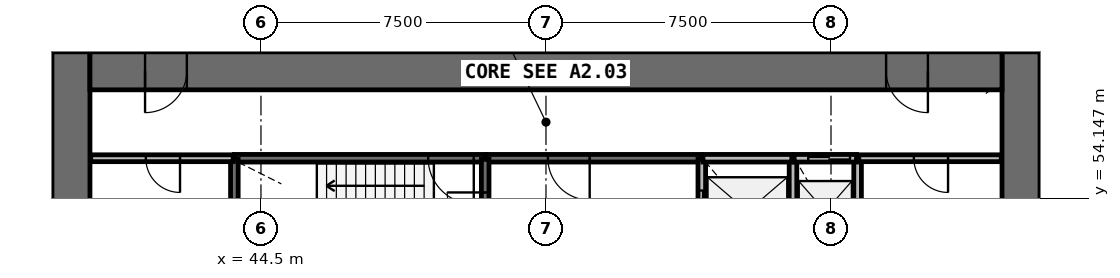
"""IFC4 building model, lengths in metres.
Left out: names, types, materials, properties, quantities, classifications, styles, units other than length and angle.
Written with IfcOpenShell. Run it as: python <this file> out.ifc"""

import sys

from ifc_helpers import new_model, si_unit, direction, frame, frame_2d, origin, place, context, subcontext, project, spatial, rectangle, extrude, source, transform, mapped, element, fill, save


model = new_model("IFC4")
c1 = context("Model", 3, precision=1e-05, world=origin(), true_north=direction((0.0, 1.0)))
c2 = subcontext(c1, "Body", "Model", "MODEL_VIEW")
j1 = project(units=[si_unit("LENGTHUNIT", "METRE"), si_unit("PLANEANGLEUNIT", "RADIAN")], contexts=[c1])
p1 = place(None, origin())
s1 = spatial("IfcSite", under=j1, at=p1, CompositionType="ELEMENT")
p2 = place(p1, origin())
s2 = spatial("IfcBuilding", under=s1, at=p2, CompositionType="ELEMENT")
p3 = place(p2, frame((0.0, 0.0, 9.4)))
s3 = spatial("IfcBuildingStorey", under=s2, at=p3, CompositionType="ELEMENT", Elevation=9.4)
p4 = place(p3, frame((64.5, 38.0, 0.0), z_axis=(0.0, 0.0, 1.0), x_axis=(0.0, 1.0, 0.0)))
e1 = element("IfcWall", 1, at=p4, inside=s3, PredefinedType="SHEAR", context=c2, shape_type="SweptSolid", body=[
    extrude(rectangle(XDim=20.0, YDim=1.0, at=frame_2d((10.0, 0.0))), origin(), (0.0, 0.0, 1.0), 4.4),
])
p5 = place(p4, frame((9.1, 0.0, 0.0)))
e2 = element("IfcOpeningElement", 2, at=p5, cuts=e1, PredefinedType="OPENING", context=c2, shape_type="SweptSolid", body=[
    extrude(rectangle(XDim=1.8, YDim=2.1, at=frame_2d((0.9, 1.05))), frame((0.0, 0.51, 0.0), z_axis=(0.0, -1.0, 0.0), x_axis=(1.0, 0.0, 0.0)), (0.0, 0.0, 1.0), 1.02),
])
p6 = place(p3, frame((39.5, 58.0, 0.0), z_axis=(0.0, 0.0, 1.0), x_axis=(0.0, -1.0, 0.0)))
e3 = element("IfcWall", 3, at=p6, inside=s3, PredefinedType="SHEAR", context=c2, shape_type="SweptSolid", body=[
    extrude(rectangle(XDim=20.0, YDim=1.0, at=frame_2d((10.0, 0.0))), origin(), (0.0, 0.0, 1.0), 4.4),
])
p7 = place(p6, frame((9.1, 0.0, 0.0)))
e4 = element("IfcOpeningElement", 4, at=p7, cuts=e3, PredefinedType="OPENING", context=c2, shape_type="SweptSolid", body=[
    extrude(rectangle(XDim=1.8, YDim=2.1, at=frame_2d((0.9, 1.05))), frame((0.0, 0.51, 0.0), z_axis=(0.0, -1.0, 0.0), x_axis=(1.0, 0.0, 0.0)), (0.0, 0.0, 1.0), 1.02),
])
p8 = place(p3, frame((64.0, 57.5, 0.0), z_axis=(0.0, 0.0, 1.0), x_axis=(-1.0, 0.0, 0.0)))
e5 = element("IfcWall", 5, at=p8, inside=s3, PredefinedType="SHEAR", context=c2, shape_type="SweptSolid", body=[
    extrude(rectangle(XDim=24.0, YDim=1.0, at=frame_2d((12.0, 0.0))), origin(), (0.0, 0.0, 1.0), 4.4),
])
p9 = place(p8, frame((21.45, 0.0, 0.0)))
e6 = element("IfcOpeningElement", 6, at=p9, cuts=e5, PredefinedType="OPENING", context=c2, shape_type="SweptSolid", body=[
    extrude(rectangle(XDim=1.1, YDim=2.1, at=frame_2d((0.55, 1.05))), frame((0.0, 0.51, 0.0), z_axis=(0.0, -1.0, 0.0), x_axis=(1.0, 0.0, 0.0)), (0.0, 0.0, 1.0), 1.02),
])
p10 = place(p8, frame((1.95, 0.0, 0.0)))
e7 = element("IfcOpeningElement", 7, at=p10, cuts=e5, PredefinedType="OPENING", context=c2, shape_type="SweptSolid", body=[
    extrude(rectangle(XDim=1.1, YDim=2.1, at=frame_2d((0.55, 1.05))), frame((0.0, 0.51, 0.0), z_axis=(0.0, -1.0, 0.0), x_axis=(1.0, 0.0, 0.0)), (0.0, 0.0, 1.0), 1.02),
])
p11 = place(p3, frame((50.4, 55.2, 0.0), z_axis=(0.0, 0.0, 1.0), x_axis=(-1.0, 0.0, 0.0)))
e8 = element("IfcWall", 8, at=p11, inside=s3, PredefinedType="SOLIDWALL", context=c2, shape_type="SweptSolid", body=[
    extrude(rectangle(XDim=6.6, YDim=0.2, at=frame_2d((3.3, 0.0))), origin(), (0.0, 0.0, 1.0), 3.95),
])
p12 = place(p11, frame((0.3, 0.0, 0.0)))
e9 = element("IfcOpeningElement", 9, at=p12, cuts=e8, PredefinedType="OPENING", context=c2, shape_type="SweptSolid", body=[
    extrude(rectangle(XDim=1.2, YDim=2.1, at=frame_2d((0.6, 1.05))), frame((0.0, 0.11, 0.0), z_axis=(0.0, -1.0, 0.0), x_axis=(1.0, 0.0, 0.0)), (0.0, 0.0, 1.0), 0.22),
])
p13 = place(p3, frame((56.1, 55.2, 0.0), z_axis=(0.0, 0.0, 1.0), x_axis=(-1.0, 0.0, 0.0)))
e10 = element("IfcWall", 10, at=p13, inside=s3, PredefinedType="SOLIDWALL", context=c2, shape_type="SweptSolid", body=[
    extrude(rectangle(XDim=5.67, YDim=0.2, at=frame_2d((2.835, 0.0))), origin(), (0.0, 0.0, 1.0), 3.95),
])
p14 = place(p13, frame((2.95, 0.0, 0.0)))
e11 = element("IfcOpeningElement", 11, at=p14, cuts=e10, PredefinedType="OPENING", context=c2, shape_type="SweptSolid", body=[
    extrude(rectangle(XDim=1.1, YDim=2.1, at=frame_2d((0.55, 1.05))), frame((0.0, 0.11, 0.0), z_axis=(0.0, -1.0, 0.0), x_axis=(1.0, 0.0, 0.0)), (0.0, 0.0, 1.0), 0.22),
])
p15 = place(p3, frame((50.4, 52.4, 0.0), z_axis=(0.0, 0.0, 1.0), x_axis=(0.0, 1.0, 0.0)))
e12 = element("IfcWall", 12, at=p15, inside=s3, PredefinedType="SOLIDWALL", context=c2, shape_type="SweptSolid", body=[
    extrude(rectangle(XDim=2.77, YDim=0.2, at=frame_2d((1.385, 0.0))), origin(), (0.0, 0.0, 1.0), 3.95),
])
p16 = place(p15, frame((0.9, 0.0, 0.0)))
e13 = element("IfcOpeningElement", 13, at=p16, cuts=e12, PredefinedType="OPENING", context=c2, shape_type="SweptSolid", body=[
    extrude(rectangle(XDim=1.0, YDim=2.1, at=frame_2d((0.5, 1.05))), frame((0.0, 0.11, 0.0), z_axis=(0.0, -1.0, 0.0), x_axis=(1.0, 0.0, 0.0)), (0.0, 0.0, 1.0), 0.22),
])
p17 = place(p3, frame((56.1, 55.17, 0.0), z_axis=(0.0, 0.0, 1.0), x_axis=(0.0, -1.0, 0.0)))
e14 = element("IfcWall", 14, at=p17, inside=s3, PredefinedType="SOLIDWALL", context=c2, shape_type="SweptSolid", body=[
    extrude(rectangle(XDim=2.77, YDim=0.2, at=frame_2d((1.385, 0.0))), origin(), (0.0, 0.0, 1.0), 3.95),
])
p18 = place(p17, frame((0.82, 0.0, 0.0)))
e15 = element("IfcOpeningElement", 15, at=p18, cuts=e14, PredefinedType="OPENING", context=c2, shape_type="SweptSolid", body=[
    extrude(rectangle(XDim=1.1, YDim=2.1, at=frame_2d((0.55, 1.05))), frame((0.0, 0.11, 0.0), z_axis=(0.0, -1.0, 0.0), x_axis=(1.0, 0.0, 0.0)), (0.0, 0.0, 1.0), 0.22),
])
for number, where, z_axis, x_axis in (
    (16, (58.5, 52.4, 0.0), (0.0, 0.0, 1.0), (0.0, 1.0, 0.0)),
    (17, (60.2, 52.4, 0.0), (0.0, 0.0, 1.0), (0.0, 1.0, 0.0)),
):
    element("IfcWall", number, at=place(p3, frame(where, z_axis=z_axis, x_axis=x_axis)), inside=s3, PredefinedType="SOLIDWALL", context=c2, shape_type="SweptSolid", body=[
        extrude(rectangle(XDim=2.8, YDim=0.2, at=frame_2d((1.4, 0.0))), origin(), (0.0, 0.0, 1.0), 3.95),
    ])
p19 = place(p3, frame((58.47, 55.2, 0.0), z_axis=(0.0, 0.0, 1.0), x_axis=(-1.0, 0.0, 0.0)))
e18 = element("IfcWall", 18, at=p19, inside=s3, PredefinedType="SOLIDWALL", context=c2, shape_type="SweptSolid", body=[
    extrude(rectangle(XDim=2.34, YDim=0.2, at=frame_2d((1.17, 0.0))), origin(), (0.0, 0.0, 1.0), 3.95),
])
p20 = place(p3, frame((43.8, 55.17, 0.0), z_axis=(0.0, 0.0, 1.0), x_axis=(0.0, -1.0, 0.0)))
e19 = element("IfcWall", 19, at=p20, inside=s3, PredefinedType="SOLIDWALL", context=c2, shape_type="SweptSolid", body=[
    extrude(rectangle(XDim=2.14, YDim=0.2, at=frame_2d((1.07, 0.0))), origin(), (0.0, 0.0, 1.0), 3.95),
])
p21 = place(p3, frame((60.17, 55.2, 0.0), z_axis=(0.0, 0.0, 1.0), x_axis=(-1.0, 0.0, 0.0)))
e20 = element("IfcWall", 20, at=p21, inside=s3, PredefinedType="SOLIDWALL", context=c2, shape_type="SweptSolid", body=[
    extrude(rectangle(XDim=1.64, YDim=0.2, at=frame_2d((0.82, 0.0))), origin(), (0.0, 0.0, 1.0), 3.95),
])
p22 = place(p21, frame((0.17, 0.0, 0.0)))
e21 = element("IfcOpeningElement", 21, at=p22, cuts=e20, PredefinedType="OPENING", context=c2, shape_type="SweptSolid", body=[
    extrude(rectangle(XDim=1.1, YDim=2.1, at=frame_2d((0.55, 1.05))), frame((0.0, 0.11, 0.0), z_axis=(0.0, -1.0, 0.0), x_axis=(1.0, 0.0, 0.0)), (0.0, 0.0, 1.0), 0.22),
])
p23 = place(p3, frame((43.77, 55.2, 0.0), z_axis=(0.0, 0.0, 1.0), x_axis=(-1.0, 0.0, 0.0)))
e22 = element("IfcWall", 22, at=p23, inside=s3, PredefinedType="PARTITIONING", context=c2, shape_type="SweptSolid", body=[
    extrude(rectangle(XDim=3.75, YDim=0.18, at=frame_2d((1.875, 0.0))), origin(), (0.0, 0.0, 1.0), 3.95),
])
p24 = place(p23, frame((1.4, 0.0, 0.0)))
e23 = element("IfcOpeningElement", 23, at=p24, cuts=e22, PredefinedType="OPENING", context=c2, shape_type="SweptSolid", body=[
    extrude(rectangle(XDim=0.9, YDim=2.1, at=frame_2d((0.45, 1.05))), frame((0.0, 0.1, 0.0), z_axis=(0.0, -1.0, 0.0), x_axis=(1.0, 0.0, 0.0)), (0.0, 0.0, 1.0), 0.2),
])
p25 = place(p3, frame((63.98, 55.2, 0.0), z_axis=(0.0, 0.0, 1.0), x_axis=(-1.0, 0.0, 0.0)))
e24 = element("IfcWall", 24, at=p25, inside=s3, PredefinedType="PARTITIONING", context=c2, shape_type="SweptSolid", body=[
    extrude(rectangle(XDim=3.75, YDim=0.18, at=frame_2d((1.875, 0.0))), origin(), (0.0, 0.0, 1.0), 3.95),
])
p26 = place(p25, frame((1.4, 0.0, 0.0)))
e25 = element("IfcOpeningElement", 25, at=p26, cuts=e24, PredefinedType="OPENING", context=c2, shape_type="SweptSolid", body=[
    extrude(rectangle(XDim=0.9, YDim=2.1, at=frame_2d((0.45, 1.05))), frame((0.0, 0.1, 0.0), z_axis=(0.0, -1.0, 0.0), x_axis=(1.0, 0.0, 0.0)), (0.0, 0.0, 1.0), 0.2),
])
m1 = source(origin(), c2, "Body", "SweptSolid", [
    extrude(rectangle(XDim=1.1, YDim=2.1, at=frame_2d((0.55, 1.05))), frame((0.0, 0.025, 0.0), z_axis=(0.0, -1.0, 0.0), x_axis=(1.0, 0.0, 0.0)), (0.0, 0.0, 1.0), 0.05),
])
p27 = place(p18, origin())
e26 = element("IfcDoor", 26, at=p27, inside=s3, OperationType="DOUBLE_DOOR_SLIDING", PredefinedType="USERDEFINED", context=c2, shape_type="MappedRepresentation", body=[
    mapped(m1, transform((0.0, 0.0, 0.0), scale=1.0)),
])
fill(e15, e26)
p28 = place(p22, origin())
e27 = element("IfcDoor", 27, at=p28, inside=s3, OperationType="DOUBLE_DOOR_SLIDING", PredefinedType="USERDEFINED", context=c2, shape_type="MappedRepresentation", body=[
    mapped(m1, transform((0.0, 0.0, 0.0), scale=1.0)),
])
fill(e21, e27)
m2 = source(origin(), c2, "Body", "SweptSolid", [
    extrude(rectangle(XDim=1.2, YDim=2.1, at=frame_2d((0.6, 1.05))), frame((0.0, 0.025, 0.0), z_axis=(0.0, -1.0, 0.0), x_axis=(1.0, 0.0, 0.0)), (0.0, 0.0, 1.0), 0.05),
])
p29 = place(p12, origin())
e28 = element("IfcDoor", 28, at=p29, inside=s3, OperationType="SINGLE_SWING_LEFT", PredefinedType="DOOR", context=c2, shape_type="MappedRepresentation", body=[
    mapped(m2, transform((0.0, 0.0, 0.0), scale=1.0)),
])
fill(e9, e28)
m3 = source(origin(), c2, "Body", "SweptSolid", [
    extrude(rectangle(XDim=1.0, YDim=2.1, at=frame_2d((0.5, 1.05))), frame((0.0, 0.025, 0.0), z_axis=(0.0, -1.0, 0.0), x_axis=(1.0, 0.0, 0.0)), (0.0, 0.0, 1.0), 0.05),
])
p30 = place(p16, origin())
e29 = element("IfcDoor", 29, at=p30, inside=s3, OperationType="SINGLE_SWING_RIGHT", PredefinedType="DOOR", context=c2, shape_type="MappedRepresentation", body=[
    mapped(m3, transform((0.0, 0.0, 0.0), scale=1.0)),
])
fill(e13, e29)
m4 = source(origin(), c2, "Body", "SweptSolid", [
    extrude(rectangle(XDim=1.1, YDim=2.1, at=frame_2d((0.55, 1.05))), frame((0.0, 0.025, 0.0), z_axis=(0.0, -1.0, 0.0), x_axis=(1.0, 0.0, 0.0)), (0.0, 0.0, 1.0), 0.05),
])
p31 = place(p14, origin())
e30 = element("IfcDoor", 30, at=p31, inside=s3, OperationType="SINGLE_SWING_LEFT", PredefinedType="DOOR", context=c2, shape_type="MappedRepresentation", body=[
    mapped(m4, transform((0.0, 0.0, 0.0), scale=1.0)),
])
fill(e11, e30)
m5 = source(origin(), c2, "Body", "SweptSolid", [
    extrude(rectangle(XDim=1.1, YDim=2.1, at=frame_2d((0.55, 1.05))), frame((0.0, 0.025, 0.0), z_axis=(0.0, -1.0, 0.0), x_axis=(1.0, 0.0, 0.0)), (0.0, 0.0, 1.0), 0.05),
])
p32 = place(p9, origin())
e31 = element("IfcDoor", 31, at=p32, inside=s3, OperationType="SINGLE_SWING_RIGHT", PredefinedType="DOOR", context=c2, shape_type="MappedRepresentation", body=[
    mapped(m5, transform((0.0, 0.0, 0.0), scale=1.0)),
])
fill(e6, e31)
p33 = place(p10, origin())
e32 = element("IfcDoor", 32, at=p33, inside=s3, OperationType="SINGLE_SWING_LEFT", PredefinedType="DOOR", context=c2, shape_type="MappedRepresentation", body=[
    mapped(m5, transform((0.0, 0.0, 0.0), scale=1.0)),
])
fill(e7, e32)
m6 = source(origin(), c2, "Body", "SweptSolid", [
    extrude(rectangle(XDim=0.9, YDim=2.1, at=frame_2d((0.45, 1.05))), frame((0.0, 0.025, 0.0), z_axis=(0.0, -1.0, 0.0), x_axis=(1.0, 0.0, 0.0)), (0.0, 0.0, 1.0), 0.05),
])
p34 = place(p24, origin())
e33 = element("IfcDoor", 33, at=p34, inside=s3, OperationType="SINGLE_SWING_LEFT", PredefinedType="DOOR", context=c2, shape_type="MappedRepresentation", body=[
    mapped(m6, transform((0.0, 0.0, 0.0), scale=1.0)),
])
fill(e23, e33)
p35 = place(p26, origin())
e34 = element("IfcDoor", 34, at=p35, inside=s3, OperationType="SINGLE_SWING_LEFT", PredefinedType="DOOR", context=c2, shape_type="MappedRepresentation", body=[
    mapped(m6, transform((0.0, 0.0, 0.0), scale=1.0)),
])
fill(e25, e34)
save(model, sys.argv[1])
